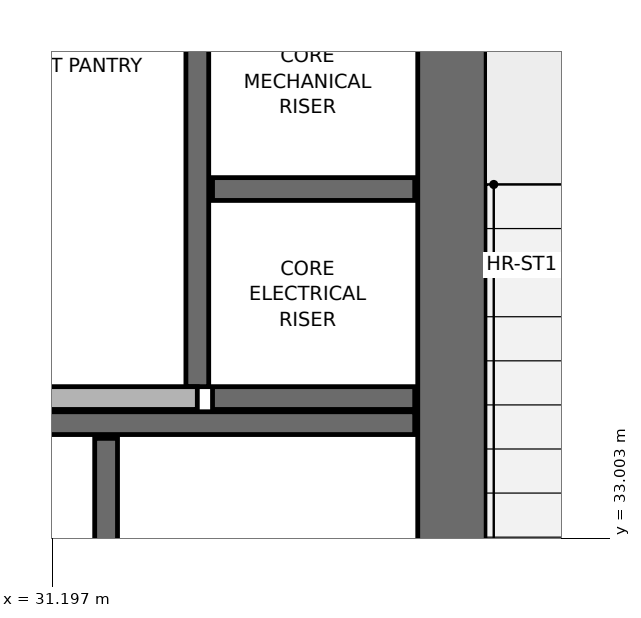
"""IFC4 building model, lengths in metres.
Left out: names, types, materials, properties, quantities, classifications, styles, units other than length and angle.
Written with IfcOpenShell. Run it as: python <this file> out.ifc"""

import sys

from ifc_helpers import new_model, si_unit, direction, frame, frame_2d, origin, place, context, subcontext, project, spatial, rectangle, extrude, element, save


model = new_model("IFC4")
c1 = context("Model", 3, precision=1e-05, world=origin(), true_north=direction((0.0, 1.0)))
c2 = subcontext(c1, "Body", "Model", "MODEL_VIEW")
j1 = project(units=[si_unit("LENGTHUNIT", "METRE"), si_unit("PLANEANGLEUNIT", "RADIAN")], contexts=[c1])
p1 = place(None, origin())
s1 = spatial("IfcSite", under=j1, at=p1, CompositionType="ELEMENT")
p2 = place(p1, origin())
s2 = spatial("IfcBuilding", under=s1, at=p2, CompositionType="ELEMENT")
p3 = place(p2, frame((0.0, 0.0, 24.0)))
s3 = spatial("IfcBuildingStorey", under=s2, at=p3, CompositionType="ELEMENT", Elevation=24.0)
p4 = place(p3, frame((33.825, 20.9, 0.0), z_axis=(0.0, 0.0, 1.0), x_axis=(0.0, 1.0, 0.0)))
e1 = element("IfcWall", 1, at=p4, inside=s3, PredefinedType="SHEAR", context=c2, shape_type="SweptSolid", body=[
    extrude(rectangle(XDim=15.8, YDim=0.45, at=frame_2d((7.9, 0.0))), origin(), (0.0, 0.0, 1.0), 6.0),
])
p5 = place(p3, frame((32.15, 34.0, 0.0), z_axis=(0.0, 0.0, 1.0), x_axis=(0.0, 1.0, 0.0)))
e2 = element("IfcWall", 2, at=p5, inside=s3, PredefinedType="SHEAR", context=c2, shape_type="SweptSolid", body=[
    extrude(rectangle(XDim=2.7, YDim=0.15, at=frame_2d((1.35, 0.0))), origin(), (0.0, 0.0, 1.0), 5.75),
])
for number, where, z_axis, x_axis in (
    (3, (32.25, 33.925, 0.0), (0.0, 0.0, 1.0), (1.0, 0.0, 0.0)),
    (4, (32.25, 35.3, 0.0), (0.0, 0.0, 1.0), (1.0, 0.0, 0.0)),
):
    element("IfcWall", number, at=place(p3, frame(where, z_axis=z_axis, x_axis=x_axis)), inside=s3, PredefinedType="SHEAR", context=c2, shape_type="SweptSolid", body=[
        extrude(rectangle(XDim=1.33, YDim=0.15, at=frame_2d((0.665, 0.0))), origin(), (0.0, 0.0, 1.0), 5.75),
    ])
p6 = place(p3, frame((29.5, 33.76, 0.0), z_axis=(0.0, 0.0, 1.0), x_axis=(1.0, 0.0, 0.0)))
e5 = element("IfcWall", 5, at=p6, inside=s3, PredefinedType="SHEAR", context=c2, shape_type="SweptSolid", body=[
    extrude(rectangle(XDim=4.08, YDim=0.15, at=frame_2d((2.04, 0.0))), origin(), (0.0, 0.0, 1.0), 5.75),
])
p7 = place(p3, frame((31.55, 31.42, 0.0), z_axis=(0.0, 0.0, 1.0), x_axis=(0.0, 1.0, 0.0)))
e6 = element("IfcWall", 6, at=p7, inside=s3, PredefinedType="SHEAR", context=c2, shape_type="SweptSolid", body=[
    extrude(rectangle(XDim=2.24, YDim=0.15, at=frame_2d((1.12, 0.0))), origin(), (0.0, 0.0, 1.0), 5.75),
])
p8 = place(p3, frame((29.525, 33.925, 0.0), z_axis=(0.0, 0.0, 1.0), x_axis=(1.0, 0.0, 0.0)))
e7 = element("IfcWall", 7, at=p8, inside=s3, PredefinedType="PARTITIONING", context=c2, shape_type="SweptSolid", body=[
    extrude(rectangle(XDim=2.625, YDim=0.15, at=frame_2d((1.312, 0.0))), origin(), (0.0, 0.0, 1.0), 5.75),
])
save(model, sys.argv[1])
